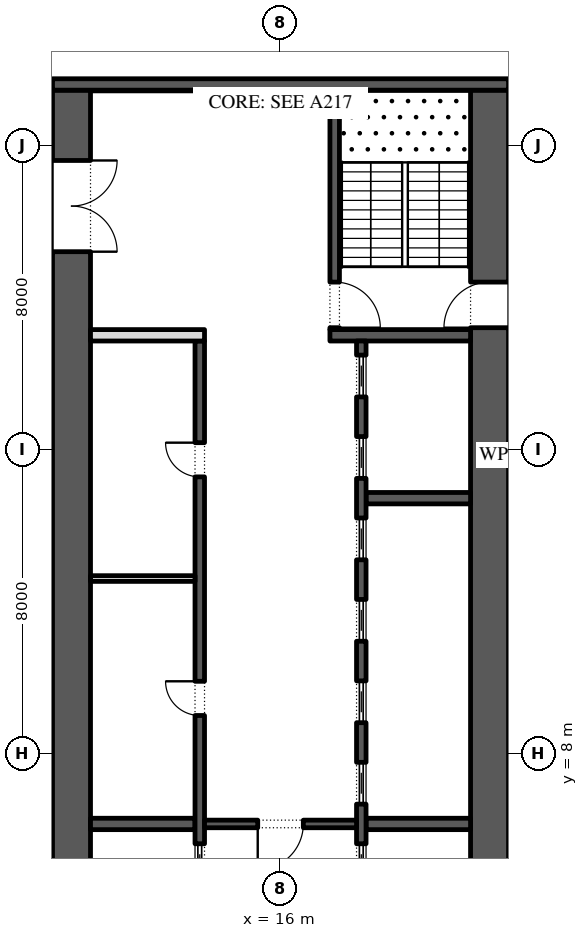
"""IFC4 building model, lengths in metres.
Left out: names, types, materials, properties, quantities, classifications, styles, units other than length and angle.
Written with IfcOpenShell. Run it as: python <this file> out.ifc"""

import sys

from ifc_helpers import new_model, si_unit, direction, frame, frame_2d, origin, place, context, subcontext, project, spatial, rectangle, extrude, element, fill, save


model = new_model("IFC4")
c1 = context("Model", 3, precision=1e-05, world=origin(), true_north=direction((0.0, 1.0)))
c2 = subcontext(c1, "Body", "Model", "MODEL_VIEW")
j1 = project(units=[si_unit("LENGTHUNIT", "METRE"), si_unit("PLANEANGLEUNIT", "RADIAN")], contexts=[c1])
p1 = place(None, origin())
s1 = spatial("IfcSite", under=j1, at=p1, CompositionType="ELEMENT")
p2 = place(p1, origin())
s2 = spatial("IfcBuilding", under=s1, at=p2, CompositionType="ELEMENT")
p3 = place(p2, frame((0.0, 0.0, 69.0)))
s3 = spatial("IfcBuildingStorey", under=s2, at=p3, CompositionType="ELEMENT", Elevation=69.0)
p4 = place(p3, frame((21.5, -2.45, 0.0), z_axis=(0.0, 0.0, 1.0), x_axis=(0.0, 1.0, 0.0)))
e1 = element("IfcWall", 1, at=p4, inside=s3, PredefinedType="SHEAR", context=c2, shape_type="SweptSolid", body=[
    extrude(rectangle(XDim=27.9, YDim=1.0, at=frame_2d((13.95, 0.0))), origin(), (0.0, 0.0, 1.0), 4.0),
])
p5 = place(p4, frame((5.05, 0.0, 0.0)))
e2 = element("IfcOpeningElement", 2, at=p5, cuts=e1, PredefinedType="OPENING", context=c2, shape_type="SweptSolid", body=[
    extrude(rectangle(XDim=1.2, YDim=2.1, at=frame_2d((0.6, 1.05))), frame((0.0, 0.51, 0.0), z_axis=(0.0, -1.0, 0.0), x_axis=(1.0, 0.0, 0.0)), (0.0, 0.0, 1.0), 1.02),
])
p6 = place(p4, frame((21.65, 0.0, 0.0)))
e3 = element("IfcOpeningElement", 3, at=p6, cuts=e1, PredefinedType="OPENING", context=c2, shape_type="SweptSolid", body=[
    extrude(rectangle(XDim=1.2, YDim=2.1, at=frame_2d((0.6, 1.05))), frame((0.0, 0.51, 0.0), z_axis=(0.0, -1.0, 0.0), x_axis=(1.0, 0.0, 0.0)), (0.0, 0.0, 1.0), 1.02),
])
p7 = place(p3, frame((10.5, -2.45, 0.0), z_axis=(0.0, 0.0, 1.0), x_axis=(0.0, 1.0, 0.0)))
e4 = element("IfcWall", 4, at=p7, inside=s3, PredefinedType="SHEAR", context=c2, shape_type="SweptSolid", body=[
    extrude(rectangle(XDim=27.9, YDim=1.0, at=frame_2d((13.95, 0.0))), origin(), (0.0, 0.0, 1.0), 4.0),
])
p8 = place(p7, frame((23.65, 0.0, 0.0)))
e5 = element("IfcOpeningElement", 5, at=p8, cuts=e4, PredefinedType="OPENING", context=c2, shape_type="SweptSolid", body=[
    extrude(rectangle(XDim=2.4, YDim=2.1, at=frame_2d((1.2, 1.05))), frame((0.0, 0.51, 0.0), z_axis=(0.0, -1.0, 0.0), x_axis=(1.0, 0.0, 0.0)), (0.0, 0.0, 1.0), 1.02),
])
p9 = place(p7, frame((1.387, 0.0, 0.0)))
e6 = element("IfcOpeningElement", 6, at=p9, cuts=e4, PredefinedType="OPENING", context=c2, shape_type="SweptSolid", body=[
    extrude(rectangle(XDim=0.9, YDim=2.1, at=frame_2d((0.45, 1.05))), frame((0.0, 0.51, 0.0), z_axis=(0.0, -1.0, 0.0), x_axis=(1.0, 0.0, 0.0)), (0.0, 0.0, 1.0), 1.02),
])
p10 = place(p7, frame((4.613, 0.0, 0.0)))
e7 = element("IfcOpeningElement", 7, at=p10, cuts=e4, PredefinedType="OPENING", context=c2, shape_type="SweptSolid", body=[
    extrude(rectangle(XDim=0.9, YDim=2.1, at=frame_2d((0.45, 1.05))), frame((0.0, 0.51, 0.0), z_axis=(0.0, -1.0, 0.0), x_axis=(1.0, 0.0, 0.0)), (0.0, 0.0, 1.0), 1.02),
])
p11 = place(p3, frame((10.0, 25.6, 0.0), z_axis=(0.0, 0.0, 1.0), x_axis=(1.0, 0.0, 0.0)))
e8 = element("IfcWall", 8, at=p11, inside=s3, PredefinedType="SHEAR", context=c2, shape_type="SweptSolid", body=[
    extrude(rectangle(XDim=12.0, YDim=0.3, at=frame_2d((6.0, 0.0))), origin(), (0.0, 0.0, 1.0), 4.0),
])
p12 = place(p3, frame((17.3, 19.0, 0.0), z_axis=(0.0, 0.0, 1.0), x_axis=(1.0, 0.0, 0.0)))
e9 = element("IfcWall", 9, at=p12, inside=s3, PredefinedType="SHEAR", context=c2, shape_type="SweptSolid", body=[
    extrude(rectangle(XDim=3.7, YDim=0.3, at=frame_2d((1.85, 0.0))), origin(), (0.0, 0.0, 1.0), 4.0),
])
p13 = place(p3, frame((17.425, 19.15, 0.0), z_axis=(0.0, 0.0, 1.0), x_axis=(0.0, 1.0, 0.0)))
e10 = element("IfcWall", 10, at=p13, inside=s3, PredefinedType="SHEAR", context=c2, shape_type="SweptSolid", body=[
    extrude(rectangle(XDim=6.3, YDim=0.25, at=frame_2d((3.15, 0.0))), origin(), (0.0, 0.0, 1.0), 4.0),
])
p14 = place(p13, frame((0.05, 0.0, 0.0)))
e11 = element("IfcOpeningElement", 11, at=p14, cuts=e10, PredefinedType="OPENING", context=c2, shape_type="SweptSolid", body=[
    extrude(rectangle(XDim=1.2, YDim=2.1, at=frame_2d((0.6, 1.05))), frame((0.0, 0.135, 0.0), z_axis=(0.0, -1.0, 0.0), x_axis=(1.0, 0.0, 0.0)), (0.0, 0.0, 1.0), 0.27),
])
for number, where, z_axis, x_axis in (
    (12, (18.25, 6.143, 0.0), (0.0, 0.0, 1.0), (1.0, 0.0, 0.0)),
    (13, (18.25, 14.714, 0.0), (0.0, 0.0, 1.0), (1.0, 0.0, 0.0)),
):
    element("IfcWall", number, at=place(p3, frame(where, z_axis=z_axis, x_axis=x_axis)), inside=s3, PredefinedType="SHEAR", context=c2, shape_type="SweptSolid", body=[
        extrude(rectangle(XDim=2.75, YDim=0.3, at=frame_2d((1.375, 0.0))), origin(), (0.0, 0.0, 1.0), 4.0),
    ])
p15 = place(p3, frame((18.125, 4.15, 0.0), z_axis=(0.0, 0.0, 1.0), x_axis=(0.0, 1.0, 0.0)))
e14 = element("IfcWall", 14, at=p15, inside=s3, PredefinedType="SHEAR", context=c2, shape_type="SweptSolid", body=[
    extrude(rectangle(XDim=14.7, YDim=0.25, at=frame_2d((7.35, 0.0))), origin(), (0.0, 0.0, 1.0), 4.0),
])
p16 = place(p15, frame((0.371, 0.0, 0.0)))
e15 = element("IfcOpeningElement", 15, at=p16, cuts=e14, PredefinedType="OPENING", context=c2, shape_type="SweptSolid", body=[
    extrude(rectangle(XDim=1.1, YDim=2.1, at=frame_2d((0.55, 1.05))), frame((0.0, 0.135, 0.0), z_axis=(0.0, -1.0, 0.0), x_axis=(1.0, 0.0, 0.0)), (0.0, 0.0, 1.0), 0.27),
])
p17 = place(p15, frame((2.514, 0.0, 0.0)))
e16 = element("IfcOpeningElement", 16, at=p17, cuts=e14, PredefinedType="OPENING", context=c2, shape_type="SweptSolid", body=[
    extrude(rectangle(XDim=1.1, YDim=2.1, at=frame_2d((0.55, 1.05))), frame((0.0, 0.135, 0.0), z_axis=(0.0, -1.0, 0.0), x_axis=(1.0, 0.0, 0.0)), (0.0, 0.0, 1.0), 0.27),
])
p18 = place(p15, frame((4.657, 0.0, 0.0)))
e17 = element("IfcOpeningElement", 17, at=p18, cuts=e14, PredefinedType="OPENING", context=c2, shape_type="SweptSolid", body=[
    extrude(rectangle(XDim=1.1, YDim=2.1, at=frame_2d((0.55, 1.05))), frame((0.0, 0.135, 0.0), z_axis=(0.0, -1.0, 0.0), x_axis=(1.0, 0.0, 0.0)), (0.0, 0.0, 1.0), 0.27),
])
p19 = place(p15, frame((6.8, 0.0, 0.0)))
e18 = element("IfcOpeningElement", 18, at=p19, cuts=e14, PredefinedType="OPENING", context=c2, shape_type="SweptSolid", body=[
    extrude(rectangle(XDim=1.1, YDim=2.1, at=frame_2d((0.55, 1.05))), frame((0.0, 0.135, 0.0), z_axis=(0.0, -1.0, 0.0), x_axis=(1.0, 0.0, 0.0)), (0.0, 0.0, 1.0), 0.27),
])
p20 = place(p15, frame((8.943, 0.0, 0.0)))
e19 = element("IfcOpeningElement", 19, at=p20, cuts=e14, PredefinedType="OPENING", context=c2, shape_type="SweptSolid", body=[
    extrude(rectangle(XDim=1.1, YDim=2.1, at=frame_2d((0.55, 1.05))), frame((0.0, 0.135, 0.0), z_axis=(0.0, -1.0, 0.0), x_axis=(1.0, 0.0, 0.0)), (0.0, 0.0, 1.0), 0.27),
])
p21 = place(p15, frame((11.086, 0.0, 0.0)))
e20 = element("IfcOpeningElement", 20, at=p21, cuts=e14, PredefinedType="OPENING", context=c2, shape_type="SweptSolid", body=[
    extrude(rectangle(XDim=1.1, YDim=2.1, at=frame_2d((0.55, 1.05))), frame((0.0, 0.135, 0.0), z_axis=(0.0, -1.0, 0.0), x_axis=(1.0, 0.0, 0.0)), (0.0, 0.0, 1.0), 0.27),
])
p22 = place(p15, frame((13.229, 0.0, 0.0)))
e21 = element("IfcOpeningElement", 21, at=p22, cuts=e14, PredefinedType="OPENING", context=c2, shape_type="SweptSolid", body=[
    extrude(rectangle(XDim=1.1, YDim=2.1, at=frame_2d((0.55, 1.05))), frame((0.0, 0.135, 0.0), z_axis=(0.0, -1.0, 0.0), x_axis=(1.0, 0.0, 0.0)), (0.0, 0.0, 1.0), 0.27),
])
p23 = place(p3, frame((11.0, 6.143, 0.0), z_axis=(0.0, 0.0, 1.0), x_axis=(1.0, 0.0, 0.0)))
e22 = element("IfcWall", 22, at=p23, inside=s3, PredefinedType="SHEAR", context=c2, shape_type="SweptSolid", body=[
    extrude(rectangle(XDim=2.75, YDim=0.3, at=frame_2d((1.375, 0.0))), origin(), (0.0, 0.0, 1.0), 4.0),
])
p24 = place(p3, frame((13.875, -2.45, 0.0), z_axis=(0.0, 0.0, 1.0), x_axis=(0.0, 1.0, 0.0)))
e23 = element("IfcWall", 23, at=p24, inside=s3, PredefinedType="SHEAR", context=c2, shape_type="SweptSolid", body=[
    extrude(rectangle(XDim=21.3, YDim=0.25, at=frame_2d((10.65, 0.0))), origin(), (0.0, 0.0, 1.0), 4.0),
])
p25 = place(p24, frame((11.446, 0.0, 0.0)))
e24 = element("IfcOpeningElement", 24, at=p25, cuts=e23, PredefinedType="OPENING", context=c2, shape_type="SweptSolid", body=[
    extrude(rectangle(XDim=0.9, YDim=2.1, at=frame_2d((0.45, 1.05))), frame((0.0, 0.135, 0.0), z_axis=(0.0, -1.0, 0.0), x_axis=(1.0, 0.0, 0.0)), (0.0, 0.0, 1.0), 0.27),
])
p26 = place(p24, frame((17.725, 0.0, 0.0)))
e25 = element("IfcOpeningElement", 25, at=p26, cuts=e23, PredefinedType="OPENING", context=c2, shape_type="SweptSolid", body=[
    extrude(rectangle(XDim=0.9, YDim=2.1, at=frame_2d((0.45, 1.05))), frame((0.0, 0.135, 0.0), z_axis=(0.0, -1.0, 0.0), x_axis=(1.0, 0.0, 0.0)), (0.0, 0.0, 1.0), 0.27),
])
p27 = place(p24, frame((6.971, 0.0, 0.0)))
e26 = element("IfcOpeningElement", 26, at=p27, cuts=e23, PredefinedType="OPENING", context=c2, shape_type="SweptSolid", body=[
    extrude(rectangle(XDim=1.1, YDim=2.1, at=frame_2d((0.55, 1.05))), frame((0.0, 0.135, 0.0), z_axis=(0.0, -1.0, 0.0), x_axis=(1.0, 0.0, 0.0)), (0.0, 0.0, 1.0), 0.27),
])
p28 = place(p3, frame((11.0, 19.0, 0.0), z_axis=(0.0, 0.0, 1.0), x_axis=(1.0, 0.0, 0.0)))
e27 = element("IfcWall", 27, at=p28, inside=s3, PredefinedType="PARTITIONING", context=c2, shape_type="SweptSolid", body=[
    extrude(rectangle(XDim=3.0, YDim=0.3, at=frame_2d((1.5, 0.0))), origin(), (0.0, 0.0, 1.0), 4.0),
])
p29 = place(p3, frame((11.0, 12.6, 0.0), z_axis=(0.0, 0.0, 1.0), x_axis=(1.0, 0.0, 0.0)))
e28 = element("IfcWall", 28, at=p29, inside=s3, PredefinedType="PARTITIONING", context=c2, shape_type="SweptSolid", body=[
    extrude(rectangle(XDim=2.75, YDim=0.15, at=frame_2d((1.375, 0.0))), origin(), (0.0, 0.0, 1.0), 4.0),
])
p30 = place(p3, frame((14.0, 6.143, 0.0), z_axis=(0.0, 0.0, 1.0), x_axis=(1.0, 0.0, 0.0)))
e29 = element("IfcWall", 29, at=p30, inside=s3, PredefinedType="SHEAR", context=c2, shape_type="SweptSolid", body=[
    extrude(rectangle(XDim=4.0, YDim=0.2, at=frame_2d((2.0, 0.0))), origin(), (0.0, 0.0, 1.0), 4.0),
])
p31 = place(p30, frame((1.4, 0.0, 0.0)))
e30 = element("IfcOpeningElement", 30, at=p31, cuts=e29, PredefinedType="OPENING", context=c2, shape_type="SweptSolid", body=[
    extrude(rectangle(XDim=1.2, YDim=2.1, at=frame_2d((0.6, 1.05))), frame((0.0, 0.11, 0.0), z_axis=(0.0, -1.0, 0.0), x_axis=(1.0, 0.0, 0.0)), (0.0, 0.0, 1.0), 0.22),
])
p32 = place(p16, origin())
e31 = element("IfcDoor", 31, at=p32, inside=s3, OperationType="SLIDING_TO_LEFT", PredefinedType="DOOR", context=c2, shape_type="SweptSolid", body=[
    extrude(rectangle(XDim=1.1, YDim=2.1, at=frame_2d((0.55, 1.05))), frame((0.0, 0.025, 0.0), z_axis=(0.0, -1.0, 0.0), x_axis=(1.0, 0.0, 0.0)), (0.0, 0.0, 1.0), 0.05),
])
fill(e15, e31)
p33 = place(p17, origin())
e32 = element("IfcDoor", 32, at=p33, inside=s3, OperationType="SLIDING_TO_LEFT", PredefinedType="DOOR", context=c2, shape_type="SweptSolid", body=[
    extrude(rectangle(XDim=1.1, YDim=2.1, at=frame_2d((0.55, 1.05))), frame((0.0, 0.025, 0.0), z_axis=(0.0, -1.0, 0.0), x_axis=(1.0, 0.0, 0.0)), (0.0, 0.0, 1.0), 0.05),
])
fill(e16, e32)
p34 = place(p18, origin())
e33 = element("IfcDoor", 33, at=p34, inside=s3, OperationType="SLIDING_TO_LEFT", PredefinedType="DOOR", context=c2, shape_type="SweptSolid", body=[
    extrude(rectangle(XDim=1.1, YDim=2.1, at=frame_2d((0.55, 1.05))), frame((0.0, 0.025, 0.0), z_axis=(0.0, -1.0, 0.0), x_axis=(1.0, 0.0, 0.0)), (0.0, 0.0, 1.0), 0.05),
])
fill(e17, e33)
p35 = place(p19, origin())
e34 = element("IfcDoor", 34, at=p35, inside=s3, OperationType="SLIDING_TO_LEFT", PredefinedType="DOOR", context=c2, shape_type="SweptSolid", body=[
    extrude(rectangle(XDim=1.1, YDim=2.1, at=frame_2d((0.55, 1.05))), frame((0.0, 0.025, 0.0), z_axis=(0.0, -1.0, 0.0), x_axis=(1.0, 0.0, 0.0)), (0.0, 0.0, 1.0), 0.05),
])
fill(e18, e34)
p36 = place(p20, origin())
e35 = element("IfcDoor", 35, at=p36, inside=s3, OperationType="SLIDING_TO_LEFT", PredefinedType="DOOR", context=c2, shape_type="SweptSolid", body=[
    extrude(rectangle(XDim=1.1, YDim=2.1, at=frame_2d((0.55, 1.05))), frame((0.0, 0.025, 0.0), z_axis=(0.0, -1.0, 0.0), x_axis=(1.0, 0.0, 0.0)), (0.0, 0.0, 1.0), 0.05),
])
fill(e19, e35)
p37 = place(p21, origin())
e36 = element("IfcDoor", 36, at=p37, inside=s3, OperationType="SLIDING_TO_LEFT", PredefinedType="DOOR", context=c2, shape_type="SweptSolid", body=[
    extrude(rectangle(XDim=1.1, YDim=2.1, at=frame_2d((0.55, 1.05))), frame((0.0, 0.025, 0.0), z_axis=(0.0, -1.0, 0.0), x_axis=(1.0, 0.0, 0.0)), (0.0, 0.0, 1.0), 0.05),
])
fill(e20, e36)
p38 = place(p22, origin())
e37 = element("IfcDoor", 37, at=p38, inside=s3, OperationType="SLIDING_TO_LEFT", PredefinedType="DOOR", context=c2, shape_type="SweptSolid", body=[
    extrude(rectangle(XDim=1.1, YDim=2.1, at=frame_2d((0.55, 1.05))), frame((0.0, 0.025, 0.0), z_axis=(0.0, -1.0, 0.0), x_axis=(1.0, 0.0, 0.0)), (0.0, 0.0, 1.0), 0.05),
])
fill(e21, e37)
p39 = place(p25, origin())
e38 = element("IfcDoor", 38, at=p39, inside=s3, OperationType="SINGLE_SWING_LEFT", PredefinedType="DOOR", context=c2, shape_type="SweptSolid", body=[
    extrude(rectangle(XDim=0.9, YDim=2.1, at=frame_2d((0.45, 1.05))), frame((0.0, 0.125, 0.0), z_axis=(0.0, -1.0, 0.0), x_axis=(1.0, 0.0, 0.0)), (0.0, 0.0, 1.0), 0.05),
])
fill(e24, e38)
p40 = place(p26, origin())
e39 = element("IfcDoor", 39, at=p40, inside=s3, OperationType="SINGLE_SWING_LEFT", PredefinedType="DOOR", context=c2, shape_type="SweptSolid", body=[
    extrude(rectangle(XDim=0.9, YDim=2.1, at=frame_2d((0.45, 1.05))), frame((0.0, 0.125, 0.0), z_axis=(0.0, -1.0, 0.0), x_axis=(1.0, 0.0, 0.0)), (0.0, 0.0, 1.0), 0.05),
])
fill(e25, e39)
p41 = place(p27, origin())
e40 = element("IfcDoor", 40, at=p41, inside=s3, OperationType="SLIDING_TO_LEFT", PredefinedType="DOOR", context=c2, shape_type="SweptSolid", body=[
    extrude(rectangle(XDim=1.1, YDim=2.1, at=frame_2d((0.55, 1.05))), frame((0.0, 0.025, 0.0), z_axis=(0.0, -1.0, 0.0), x_axis=(1.0, 0.0, 0.0)), (0.0, 0.0, 1.0), 0.05),
])
fill(e26, e40)
p42 = place(p31, frame((1.2, 0.0, 0.0), z_axis=(0.0, 0.0, 1.0), x_axis=(-1.0, 0.0, 0.0)))
e41 = element("IfcDoor", 41, at=p42, inside=s3, OperationType="SINGLE_SWING_LEFT", PredefinedType="DOOR", context=c2, shape_type="SweptSolid", body=[
    extrude(rectangle(XDim=1.2, YDim=2.1, at=frame_2d((0.6, 1.05))), frame((0.0, 0.025, 0.0), z_axis=(0.0, -1.0, 0.0), x_axis=(1.0, 0.0, 0.0)), (0.0, 0.0, 1.0), 0.05),
])
fill(e30, e41)
p43 = place(p8, frame((2.4, 0.0, 0.0), z_axis=(0.0, 0.0, 1.0), x_axis=(-1.0, 0.0, 0.0)))
e42 = element("IfcDoor", 42, at=p43, inside=s3, OperationType="DOUBLE_DOOR_SINGLE_SWING", PredefinedType="DOOR", context=c2, shape_type="SweptSolid", body=[
    extrude(rectangle(XDim=2.4, YDim=2.1, at=frame_2d((1.2, 1.05))), frame((0.0, 0.025, 0.0), z_axis=(0.0, -1.0, 0.0), x_axis=(1.0, 0.0, 0.0)), (0.0, 0.0, 1.0), 0.05),
])
fill(e5, e42)
p44 = place(p14, frame((1.2, 0.0, 0.0), z_axis=(0.0, 0.0, 1.0), x_axis=(-1.0, 0.0, 0.0)))
e43 = element("IfcDoor", 43, at=p44, inside=s3, OperationType="SINGLE_SWING_LEFT", PredefinedType="DOOR", context=c2, shape_type="SweptSolid", body=[
    extrude(rectangle(XDim=1.2, YDim=2.1, at=frame_2d((0.6, 1.05))), frame((0.0, 0.025, 0.0), z_axis=(0.0, -1.0, 0.0), x_axis=(1.0, 0.0, 0.0)), (0.0, 0.0, 1.0), 0.05),
])
fill(e11, e43)
p45 = place(p6, origin())
e44 = element("IfcDoor", 44, at=p45, inside=s3, OperationType="SINGLE_SWING_RIGHT", PredefinedType="DOOR", context=c2, shape_type="SweptSolid", body=[
    extrude(rectangle(XDim=1.2, YDim=2.1, at=frame_2d((0.6, 1.05))), frame((0.0, 0.025, 0.0), z_axis=(0.0, -1.0, 0.0), x_axis=(1.0, 0.0, 0.0)), (0.0, 0.0, 1.0), 0.05),
])
fill(e3, e44)
save(model, sys.argv[1])
